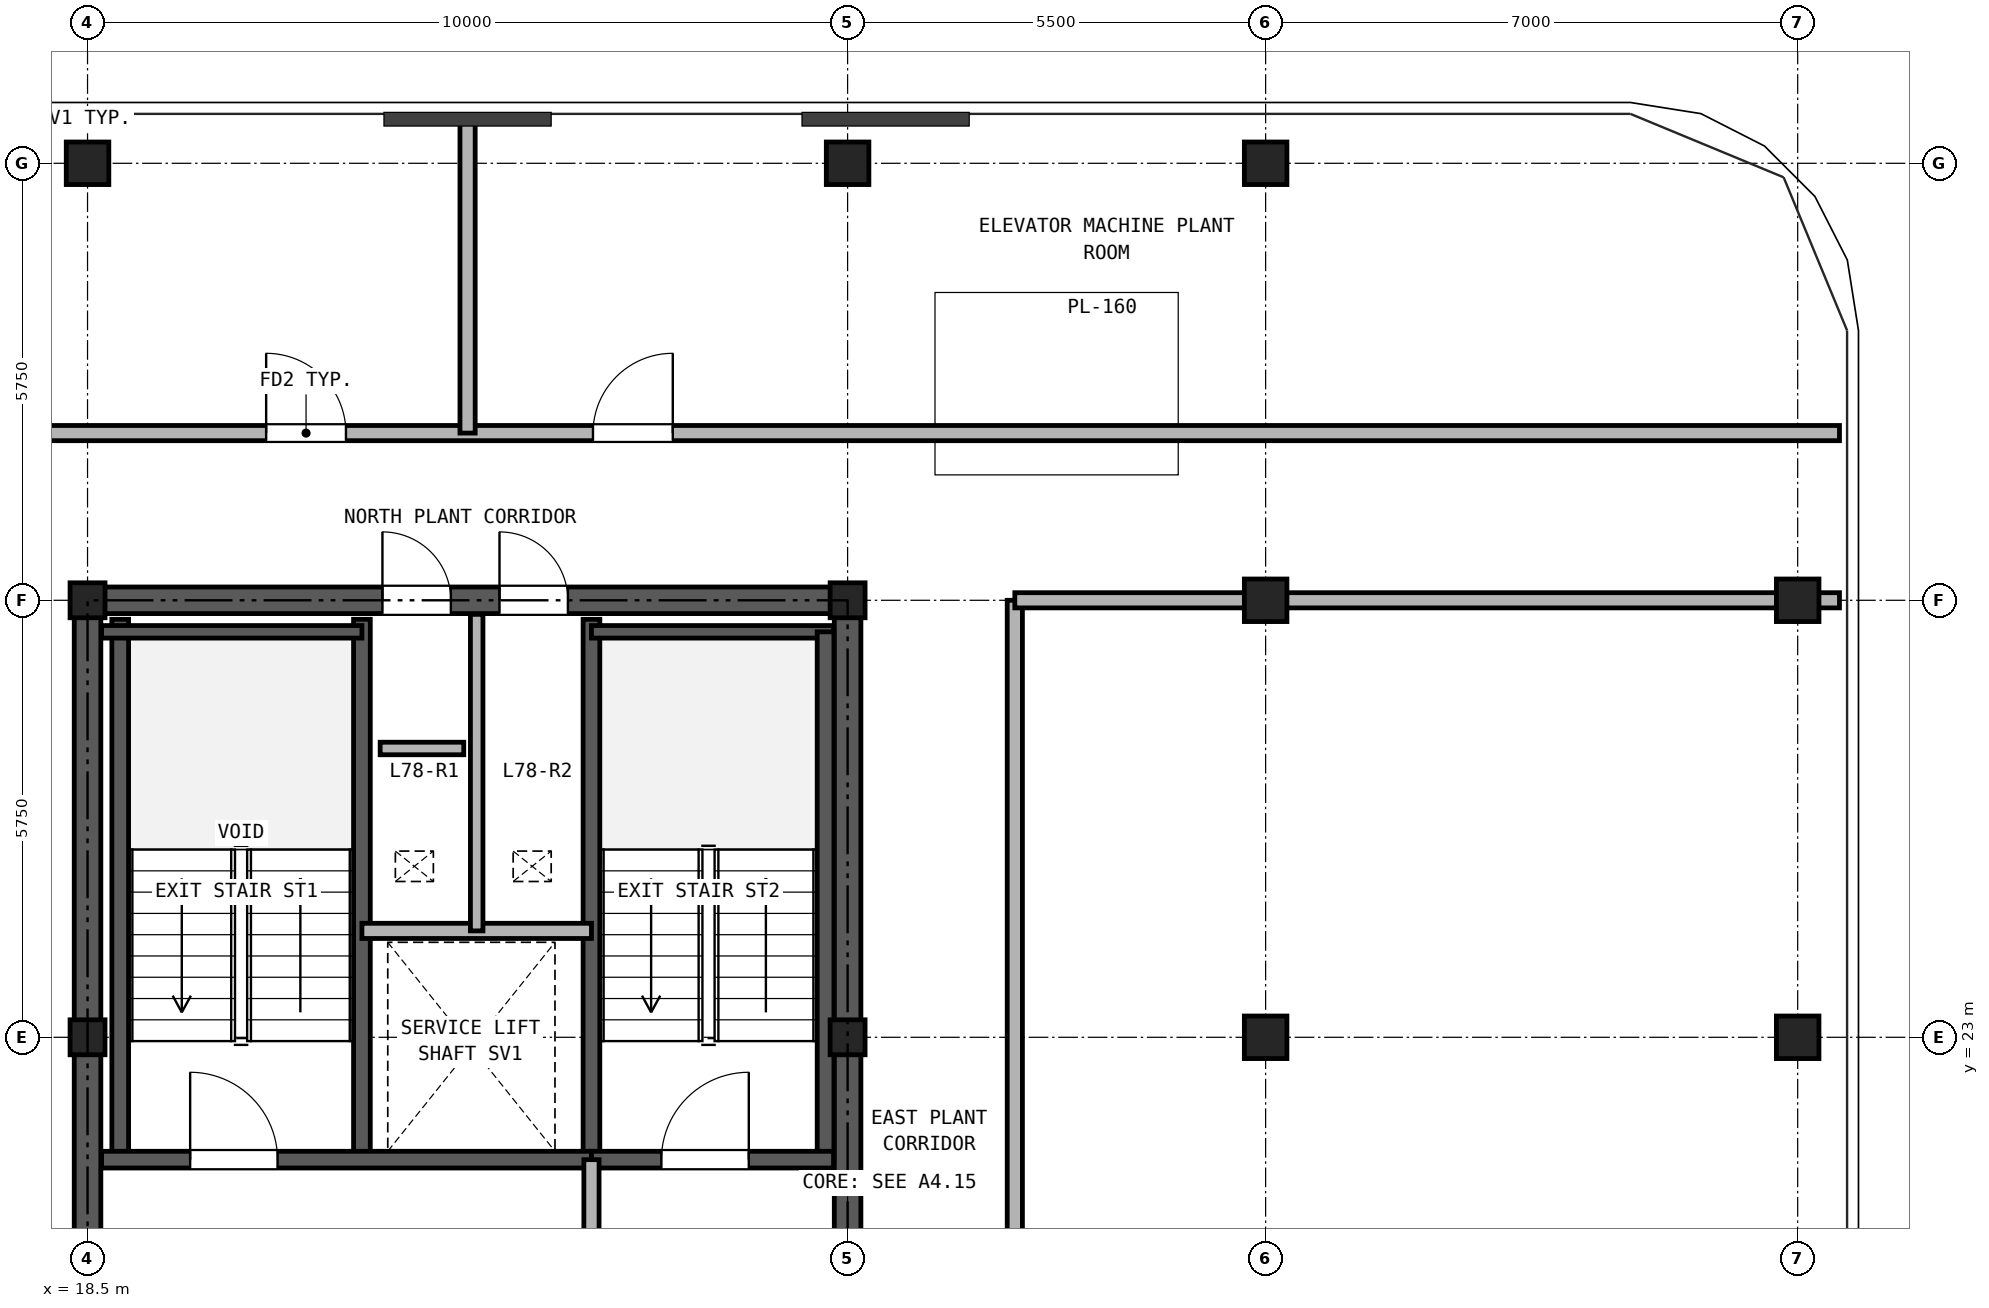
"""IFC4 building model, lengths in metres.
Left out: names, types, materials, properties, quantities, classifications, styles, units other than length and angle.
Written with IfcOpenShell. Run it as: python <this file> out.ifc"""

import sys

from ifc_helpers import new_model, si_unit, direction, frame, frame_2d, origin, origin_2d, place, context, subcontext, project, spatial, rectangle, hollow_rectangle, extrude, source, transform, mapped, element, fill, save


model = new_model("IFC4")
c1 = context("Model", 3, precision=1e-05, world=origin(), true_north=direction((0.0, 1.0)))
c2 = subcontext(c1, "Body", "Model", "MODEL_VIEW")
j1 = project(units=[si_unit("LENGTHUNIT", "METRE"), si_unit("PLANEANGLEUNIT", "RADIAN")], contexts=[c1])
p1 = place(None, origin())
s1 = spatial("IfcSite", under=j1, at=p1, CompositionType="ELEMENT")
p2 = place(p1, origin())
s2 = spatial("IfcBuilding", under=s1, at=p2, CompositionType="ELEMENT")
p3 = place(p2, frame((0.0, 0.0, 271.3)))
s3 = spatial("IfcBuildingStorey", under=s2, at=p3, CompositionType="ELEMENT", Elevation=271.3)
m1 = source(origin(), c2, "Body", "SweptSolid", [
    extrude(hollow_rectangle(XDim=0.56, YDim=0.56, WallThickness=0.03, at=origin_2d()), origin(), (0.0, 0.0, 1.0), 3.38),
])
for number, where, z_axis, x_axis in (
    (1, (18.5, 34.5, 0.0), (0.0, 0.0, 1.0), (1.0, 0.0, 0.0)),
    (2, (28.5, 34.5, 0.0), (0.0, 0.0, 1.0), (1.0, 0.0, 0.0)),
    (3, (34.0, 34.5, 0.0), (0.0, 0.0, 1.0), (1.0, 0.0, 0.0)),
    (4, (41.0, 23.0, 0.0), (0.0, 0.0, 1.0), (1.0, 0.0, 0.0)),
    (5, (41.0, 28.75, 0.0), (0.0, 0.0, 1.0), (1.0, 0.0, 0.0)),
):
    element("IfcColumn", number, at=place(p3, frame(where, z_axis=z_axis, x_axis=x_axis)), inside=s3, PredefinedType="COLUMN", context=c2, shape_type="MappedRepresentation", body=[
        mapped(m1, transform((0.0, 0.0, 0.0), x_axis=(1.0, 0.0, 0.0), y_axis=(0.0, 1.0, 0.0), z_axis=(0.0, 0.0, 1.0), scale=1.0)),
    ])
m2 = source(origin(), c2, "Body", "SweptSolid", [
    extrude(hollow_rectangle(XDim=0.46, YDim=0.46, WallThickness=0.025, at=origin_2d()), origin(), (0.0, 0.0, 1.0), 3.38),
])
for number, where, z_axis, x_axis in (
    (6, (18.5, 23.0, 0.0), (0.0, 0.0, 1.0), (1.0, 0.0, 0.0)),
    (7, (18.5, 28.75, 0.0), (0.0, 0.0, 1.0), (1.0, 0.0, 0.0)),
    (8, (28.5, 23.0, 0.0), (0.0, 0.0, 1.0), (1.0, 0.0, 0.0)),
    (9, (28.5, 28.75, 0.0), (0.0, 0.0, 1.0), (1.0, 0.0, 0.0)),
):
    element("IfcColumn", number, at=place(p3, frame(where, z_axis=z_axis, x_axis=x_axis)), inside=s3, PredefinedType="COLUMN", context=c2, shape_type="MappedRepresentation", body=[
        mapped(m2, transform((0.0, 0.0, 0.0), x_axis=(1.0, 0.0, 0.0), y_axis=(0.0, 1.0, 0.0), z_axis=(0.0, 0.0, 1.0), scale=1.0)),
    ])
for number, where, z_axis, x_axis in (
    (10, (34.0, 23.0, 0.0), (0.0, 0.0, 1.0), (1.0, 0.0, 0.0)),
    (11, (34.0, 28.75, 0.0), (0.0, 0.0, 1.0), (1.0, 0.0, 0.0)),
):
    element("IfcColumn", number, at=place(p3, frame(where, z_axis=z_axis, x_axis=x_axis)), inside=s3, PredefinedType="COLUMN", context=c2, shape_type="MappedRepresentation", body=[
        mapped(m1, transform((0.0, 0.0, 0.0), x_axis=(1.0, 0.0, 0.0), y_axis=(0.0, 1.0, 0.0), z_axis=(0.0, 0.0, 1.0), scale=1.0)),
    ])
p4 = place(p3, frame((18.325, 28.75, 0.0), z_axis=(0.0, 0.0, 1.0), x_axis=(1.0, 0.0, 0.0)))
e12 = element("IfcWall", 12, at=p4, inside=s3, PredefinedType="SHEAR", context=c2, shape_type="SweptSolid", body=[
    extrude(rectangle(XDim=10.35, YDim=0.35, at=frame_2d((5.175, 0.0))), origin(), (0.0, 0.0, 1.0), 3.38),
])
p5 = place(p4, frame((4.055, 0.0, 0.0)))
e13 = element("IfcOpeningElement", 13, at=p5, cuts=e12, PredefinedType="OPENING", context=c2, shape_type="SweptSolid", body=[
    extrude(rectangle(XDim=0.9, YDim=2.05, at=frame_2d((0.45, 1.025))), frame((0.0, 0.185, 0.0), z_axis=(0.0, -1.0, 0.0), x_axis=(1.0, 0.0, 0.0)), (0.0, 0.0, 1.0), 0.37),
])
p6 = place(p4, frame((5.595, 0.0, 0.0)))
e14 = element("IfcOpeningElement", 14, at=p6, cuts=e12, PredefinedType="OPENING", context=c2, shape_type="SweptSolid", body=[
    extrude(rectangle(XDim=0.9, YDim=2.05, at=frame_2d((0.45, 1.025))), frame((0.0, 0.185, 0.0), z_axis=(0.0, -1.0, 0.0), x_axis=(1.0, 0.0, 0.0)), (0.0, 0.0, 1.0), 0.37),
])
p7 = place(p3, frame((18.5, 11.675, 0.0), z_axis=(0.0, 0.0, 1.0), x_axis=(0.0, 1.0, 0.0)))
e15 = element("IfcWall", 15, at=p7, inside=s3, PredefinedType="SHEAR", context=c2, shape_type="SweptSolid", body=[
    extrude(rectangle(XDim=16.9, YDim=0.35, at=frame_2d((8.45, 0.0))), origin(), (0.0, 0.0, 1.0), 3.38),
])
p8 = place(p7, frame((7.475, 0.0, 0.0)))
e16 = element("IfcOpeningElement", 16, at=p8, cuts=e15, PredefinedType="OPENING", context=c2, shape_type="SweptSolid", body=[
    extrude(rectangle(XDim=1.15, YDim=2.2, at=frame_2d((0.575, 1.1))), frame((0.0, 0.185, 0.0), z_axis=(0.0, -1.0, 0.0), x_axis=(1.0, 0.0, 0.0)), (0.0, 0.0, 1.0), 0.37),
])
p9 = place(p3, frame((28.5, 11.675, 0.0), z_axis=(0.0, 0.0, 1.0), x_axis=(0.0, 1.0, 0.0)))
e17 = element("IfcWall", 17, at=p9, inside=s3, PredefinedType="SHEAR", context=c2, shape_type="SweptSolid", body=[
    extrude(rectangle(XDim=16.9, YDim=0.35, at=frame_2d((8.45, 0.0))), origin(), (0.0, 0.0, 1.0), 3.38),
])
p10 = place(p9, frame((7.475, 0.0, 0.0)))
e18 = element("IfcOpeningElement", 18, at=p10, cuts=e17, PredefinedType="OPENING", context=c2, shape_type="SweptSolid", body=[
    extrude(rectangle(XDim=1.15, YDim=2.2, at=frame_2d((0.575, 1.1))), frame((0.0, 0.185, 0.0), z_axis=(0.0, -1.0, 0.0), x_axis=(1.0, 0.0, 0.0)), (0.0, 0.0, 1.0), 0.37),
])
for number, where, z_axis, x_axis in (
    (19, (18.93, 21.39, 0.0), (0.0, 0.0, 1.0), (0.0, 1.0, 0.0)),
    (20, (22.11, 21.39, 0.0), (0.0, 0.0, 1.0), (0.0, 1.0, 0.0)),
    (21, (25.13, 21.39, 0.0), (0.0, 0.0, 1.0), (0.0, 1.0, 0.0)),
):
    element("IfcWall", number, at=place(p3, frame(where, z_axis=z_axis, x_axis=x_axis)), inside=s3, PredefinedType="SOLIDWALL", context=c2, shape_type="SweptSolid", body=[
        extrude(rectangle(XDim=7.11, YDim=0.22, at=frame_2d((3.555, 0.0))), origin(), (0.0, 0.0, 1.0), 3.38),
    ])
p11 = place(p3, frame((18.685, 28.335, 0.0), z_axis=(0.0, 0.0, 1.0), x_axis=(1.0, 0.0, 0.0)))
e22 = element("IfcWall", 22, at=p11, inside=s3, PredefinedType="PARTITIONING", context=c2, shape_type="SweptSolid", body=[
    extrude(rectangle(XDim=3.425, YDim=0.165, at=frame_2d((1.712, 0.0))), origin(), (0.0, 0.0, 1.0), 3.38),
])
p12 = place(p3, frame((25.13, 28.335, 0.0), z_axis=(0.0, 0.0, 1.0), x_axis=(1.0, 0.0, 0.0)))
e23 = element("IfcWall", 23, at=p12, inside=s3, PredefinedType="PARTITIONING", context=c2, shape_type="SweptSolid", body=[
    extrude(rectangle(XDim=3.185, YDim=0.165, at=frame_2d((1.593, 0.0))), origin(), (0.0, 0.0, 1.0), 3.38),
])
p13 = place(p3, frame((28.21, 21.39, 0.0), z_axis=(0.0, 0.0, 1.0), x_axis=(0.0, 1.0, 0.0)))
e24 = element("IfcWall", 24, at=p13, inside=s3, PredefinedType="SOLIDWALL", context=c2, shape_type="SweptSolid", body=[
    extrude(rectangle(XDim=6.945, YDim=0.22, at=frame_2d((3.473, 0.0))), origin(), (0.0, 0.0, 1.0), 3.38),
])
p14 = place(p3, frame((18.685, 21.39, 0.0), z_axis=(0.0, 0.0, 1.0), x_axis=(1.0, 0.0, 0.0)))
e25 = element("IfcWall", 25, at=p14, inside=s3, PredefinedType="SOLIDWALL", context=c2, shape_type="SweptSolid", body=[
    extrude(rectangle(XDim=6.445, YDim=0.22, at=frame_2d((3.222, 0.0))), origin(), (0.0, 0.0, 1.0), 3.38),
])
p15 = place(p14, frame((1.165, 0.0, 0.0)))
e26 = element("IfcOpeningElement", 26, at=p15, cuts=e25, PredefinedType="OPENING", context=c2, shape_type="SweptSolid", body=[
    extrude(rectangle(XDim=1.15, YDim=2.2, at=frame_2d((0.575, 1.1))), frame((0.0, 0.12, 0.0), z_axis=(0.0, -1.0, 0.0), x_axis=(1.0, 0.0, 0.0)), (0.0, 0.0, 1.0), 0.24),
])
p16 = place(p3, frame((25.13, 21.39, 0.0), z_axis=(0.0, 0.0, 1.0), x_axis=(1.0, 0.0, 0.0)))
e27 = element("IfcWall", 27, at=p16, inside=s3, PredefinedType="SOLIDWALL", context=c2, shape_type="SweptSolid", body=[
    extrude(rectangle(XDim=3.185, YDim=0.22, at=frame_2d((1.593, 0.0))), origin(), (0.0, 0.0, 1.0), 3.38),
])
p17 = place(p16, frame((0.92, 0.0, 0.0)))
e28 = element("IfcOpeningElement", 28, at=p17, cuts=e27, PredefinedType="OPENING", context=c2, shape_type="SweptSolid", body=[
    extrude(rectangle(XDim=1.15, YDim=2.2, at=frame_2d((0.575, 1.1))), frame((0.0, 0.12, 0.0), z_axis=(0.0, -1.0, 0.0), x_axis=(1.0, 0.0, 0.0)), (0.0, 0.0, 1.0), 0.24),
])
p18 = place(p3, frame((22.11, 24.4, 0.0), z_axis=(0.0, 0.0, 1.0), x_axis=(1.0, 0.0, 0.0)))
e29 = element("IfcWall", 29, at=p18, inside=s3, PredefinedType="PARTITIONING", context=c2, shape_type="SweptSolid", body=[
    extrude(rectangle(XDim=3.02, YDim=0.2, at=frame_2d((1.51, 0.0))), origin(), (0.0, 0.0, 1.0), 3.38),
])
p19 = place(p3, frame((23.62, 24.4, 0.0), z_axis=(0.0, 0.0, 1.0), x_axis=(0.0, 1.0, 0.0)))
e30 = element("IfcWall", 30, at=p19, inside=s3, PredefinedType="PARTITIONING", context=c2, shape_type="SweptSolid", body=[
    extrude(rectangle(XDim=4.165, YDim=0.165, at=frame_2d((2.083, 0.0))), origin(), (0.0, 0.0, 1.0), 3.38),
])
p20 = place(p3, frame((25.13, 18.0, 0.0), z_axis=(0.0, 0.0, 1.0), x_axis=(0.0, 1.0, 0.0)))
e31 = element("IfcWall", 31, at=p20, inside=s3, PredefinedType="PARTITIONING", context=c2, shape_type="SweptSolid", body=[
    extrude(rectangle(XDim=3.39, YDim=0.2, at=frame_2d((1.695, 0.0))), origin(), (0.0, 0.0, 1.0), 3.38),
])
p21 = place(p20, frame((1.1, 0.0, 0.0)))
e32 = element("IfcOpeningElement", 32, at=p21, cuts=e31, PredefinedType="OPENING", context=c2, shape_type="SweptSolid", body=[
    extrude(rectangle(XDim=1.15, YDim=2.2, at=frame_2d((0.575, 1.1))), frame((0.0, 0.11, 0.0), z_axis=(0.0, -1.0, 0.0), x_axis=(1.0, 0.0, 0.0)), (0.0, 0.0, 1.0), 0.22),
])
p22 = place(p3, frame((5.45, 30.95, 0.0), z_axis=(0.0, 0.0, 1.0), x_axis=(1.0, 0.0, 0.0)))
e33 = element("IfcWall", 33, at=p22, inside=s3, PredefinedType="PARTITIONING", context=c2, shape_type="SweptSolid", body=[
    extrude(rectangle(XDim=36.1, YDim=0.2, at=frame_2d((18.05, 0.0))), origin(), (0.0, 0.0, 1.0), 3.38),
])
p23 = place(p22, frame((15.4, 0.0, 0.0)))
e34 = element("IfcOpeningElement", 34, at=p23, cuts=e33, PredefinedType="OPENING", context=c2, shape_type="SweptSolid", body=[
    extrude(rectangle(XDim=1.05, YDim=2.15, at=frame_2d((0.525, 1.075))), frame((0.0, 0.11, 0.0), z_axis=(0.0, -1.0, 0.0), x_axis=(1.0, 0.0, 0.0)), (0.0, 0.0, 1.0), 0.22),
])
p24 = place(p22, frame((19.7, 0.0, 0.0)))
e35 = element("IfcOpeningElement", 35, at=p24, cuts=e33, PredefinedType="OPENING", context=c2, shape_type="SweptSolid", body=[
    extrude(rectangle(XDim=1.05, YDim=2.15, at=frame_2d((0.525, 1.075))), frame((0.0, 0.11, 0.0), z_axis=(0.0, -1.0, 0.0), x_axis=(1.0, 0.0, 0.0)), (0.0, 0.0, 1.0), 0.22),
])
p25 = place(p3, frame((30.7, 8.9, 0.0), z_axis=(0.0, 0.0, 1.0), x_axis=(0.0, 1.0, 0.0)))
e36 = element("IfcWall", 36, at=p25, inside=s3, PredefinedType="PARTITIONING", context=c2, shape_type="SweptSolid", body=[
    extrude(rectangle(XDim=19.85, YDim=0.2, at=frame_2d((9.925, 0.0))), origin(), (0.0, 0.0, 1.0), 3.38),
])
p26 = place(p25, frame((9.425, 0.0, 0.0)))
e37 = element("IfcOpeningElement", 37, at=p26, cuts=e36, PredefinedType="OPENING", context=c2, shape_type="SweptSolid", body=[
    extrude(rectangle(XDim=1.05, YDim=2.15, at=frame_2d((0.525, 1.075))), frame((0.0, 0.11, 0.0), z_axis=(0.0, -1.0, 0.0), x_axis=(1.0, 0.0, 0.0)), (0.0, 0.0, 1.0), 0.22),
])
p27 = place(p3, frame((30.7, 28.75, 0.0), z_axis=(0.0, 0.0, 1.0), x_axis=(1.0, 0.0, 0.0)))
e38 = element("IfcWall", 38, at=p27, inside=s3, PredefinedType="PARTITIONING", context=c2, shape_type="SweptSolid", body=[
    extrude(rectangle(XDim=10.85, YDim=0.2, at=frame_2d((5.425, 0.0))), origin(), (0.0, 0.0, 1.0), 2.905),
])
p28 = place(p3, frame((23.5, 30.95, 0.0), z_axis=(0.0, 0.0, 1.0), x_axis=(0.0, 1.0, 0.0)))
e39 = element("IfcWall", 39, at=p28, inside=s3, PredefinedType="PARTITIONING", context=c2, shape_type="SweptSolid", body=[
    extrude(rectangle(XDim=4.1, YDim=0.2, at=frame_2d((2.05, 0.0))), origin(), (0.0, 0.0, 1.0), 3.38),
])
p29 = place(p3, frame((22.35, 26.8, 0.0), z_axis=(0.0, 0.0, 1.0), x_axis=(1.0, 0.0, 0.0)))
e40 = element("IfcWall", 40, at=p29, inside=s3, PredefinedType="PARTITIONING", context=c2, shape_type="SweptSolid", body=[
    extrude(rectangle(XDim=1.1, YDim=0.165, at=frame_2d((0.55, 0.0))), origin(), (0.0, 0.0, 1.0), 3.38),
])
p30 = place(p15, frame((1.15, 0.0, 0.0), z_axis=(0.0, 0.0, 1.0), x_axis=(-1.0, 0.0, 0.0)))
e41 = element("IfcDoor", 41, at=p30, inside=s3, OperationType="SINGLE_SWING_LEFT", PredefinedType="DOOR", context=c2, shape_type="SweptSolid", body=[
    extrude(rectangle(XDim=1.15, YDim=2.2, at=frame_2d((0.575, 1.1))), frame((0.0, 0.025, 0.0), z_axis=(0.0, -1.0, 0.0), x_axis=(1.0, 0.0, 0.0)), (0.0, 0.0, 1.0), 0.05),
])
fill(e26, e41)
p31 = place(p17, frame((1.15, 0.0, 0.0), z_axis=(0.0, 0.0, 1.0), x_axis=(-1.0, 0.0, 0.0)))
e42 = element("IfcDoor", 42, at=p31, inside=s3, OperationType="SINGLE_SWING_RIGHT", PredefinedType="DOOR", context=c2, shape_type="SweptSolid", body=[
    extrude(rectangle(XDim=1.15, YDim=2.2, at=frame_2d((0.575, 1.1))), frame((0.0, 0.025, 0.0), z_axis=(0.0, -1.0, 0.0), x_axis=(1.0, 0.0, 0.0)), (0.0, 0.0, 1.0), 0.05),
])
fill(e28, e42)
p32 = place(p5, origin())
e43 = element("IfcDoor", 43, at=p32, inside=s3, OperationType="SINGLE_SWING_LEFT", PredefinedType="DOOR", context=c2, shape_type="SweptSolid", body=[
    extrude(rectangle(XDim=0.9, YDim=2.05, at=frame_2d((0.45, 1.025))), frame((0.0, 0.025, 0.0), z_axis=(0.0, -1.0, 0.0), x_axis=(1.0, 0.0, 0.0)), (0.0, 0.0, 1.0), 0.05),
])
fill(e13, e43)
p33 = place(p6, origin())
e44 = element("IfcDoor", 44, at=p33, inside=s3, OperationType="SINGLE_SWING_LEFT", PredefinedType="DOOR", context=c2, shape_type="SweptSolid", body=[
    extrude(rectangle(XDim=0.9, YDim=2.05, at=frame_2d((0.45, 1.025))), frame((0.0, 0.025, 0.0), z_axis=(0.0, -1.0, 0.0), x_axis=(1.0, 0.0, 0.0)), (0.0, 0.0, 1.0), 0.05),
])
fill(e14, e44)
p34 = place(p23, origin())
e45 = element("IfcDoor", 45, at=p34, inside=s3, OperationType="SINGLE_SWING_LEFT", PredefinedType="DOOR", context=c2, shape_type="SweptSolid", body=[
    extrude(rectangle(XDim=1.05, YDim=2.15, at=frame_2d((0.525, 1.075))), frame((0.0, 0.025, 0.0), z_axis=(0.0, -1.0, 0.0), x_axis=(1.0, 0.0, 0.0)), (0.0, 0.0, 1.0), 0.05),
])
fill(e34, e45)
p35 = place(p24, origin())
e46 = element("IfcDoor", 46, at=p35, inside=s3, OperationType="SINGLE_SWING_RIGHT", PredefinedType="DOOR", context=c2, shape_type="SweptSolid", body=[
    extrude(rectangle(XDim=1.05, YDim=2.15, at=frame_2d((0.525, 1.075))), frame((0.0, 0.025, 0.0), z_axis=(0.0, -1.0, 0.0), x_axis=(1.0, 0.0, 0.0)), (0.0, 0.0, 1.0), 0.05),
])
fill(e35, e46)
save(model, sys.argv[1])
